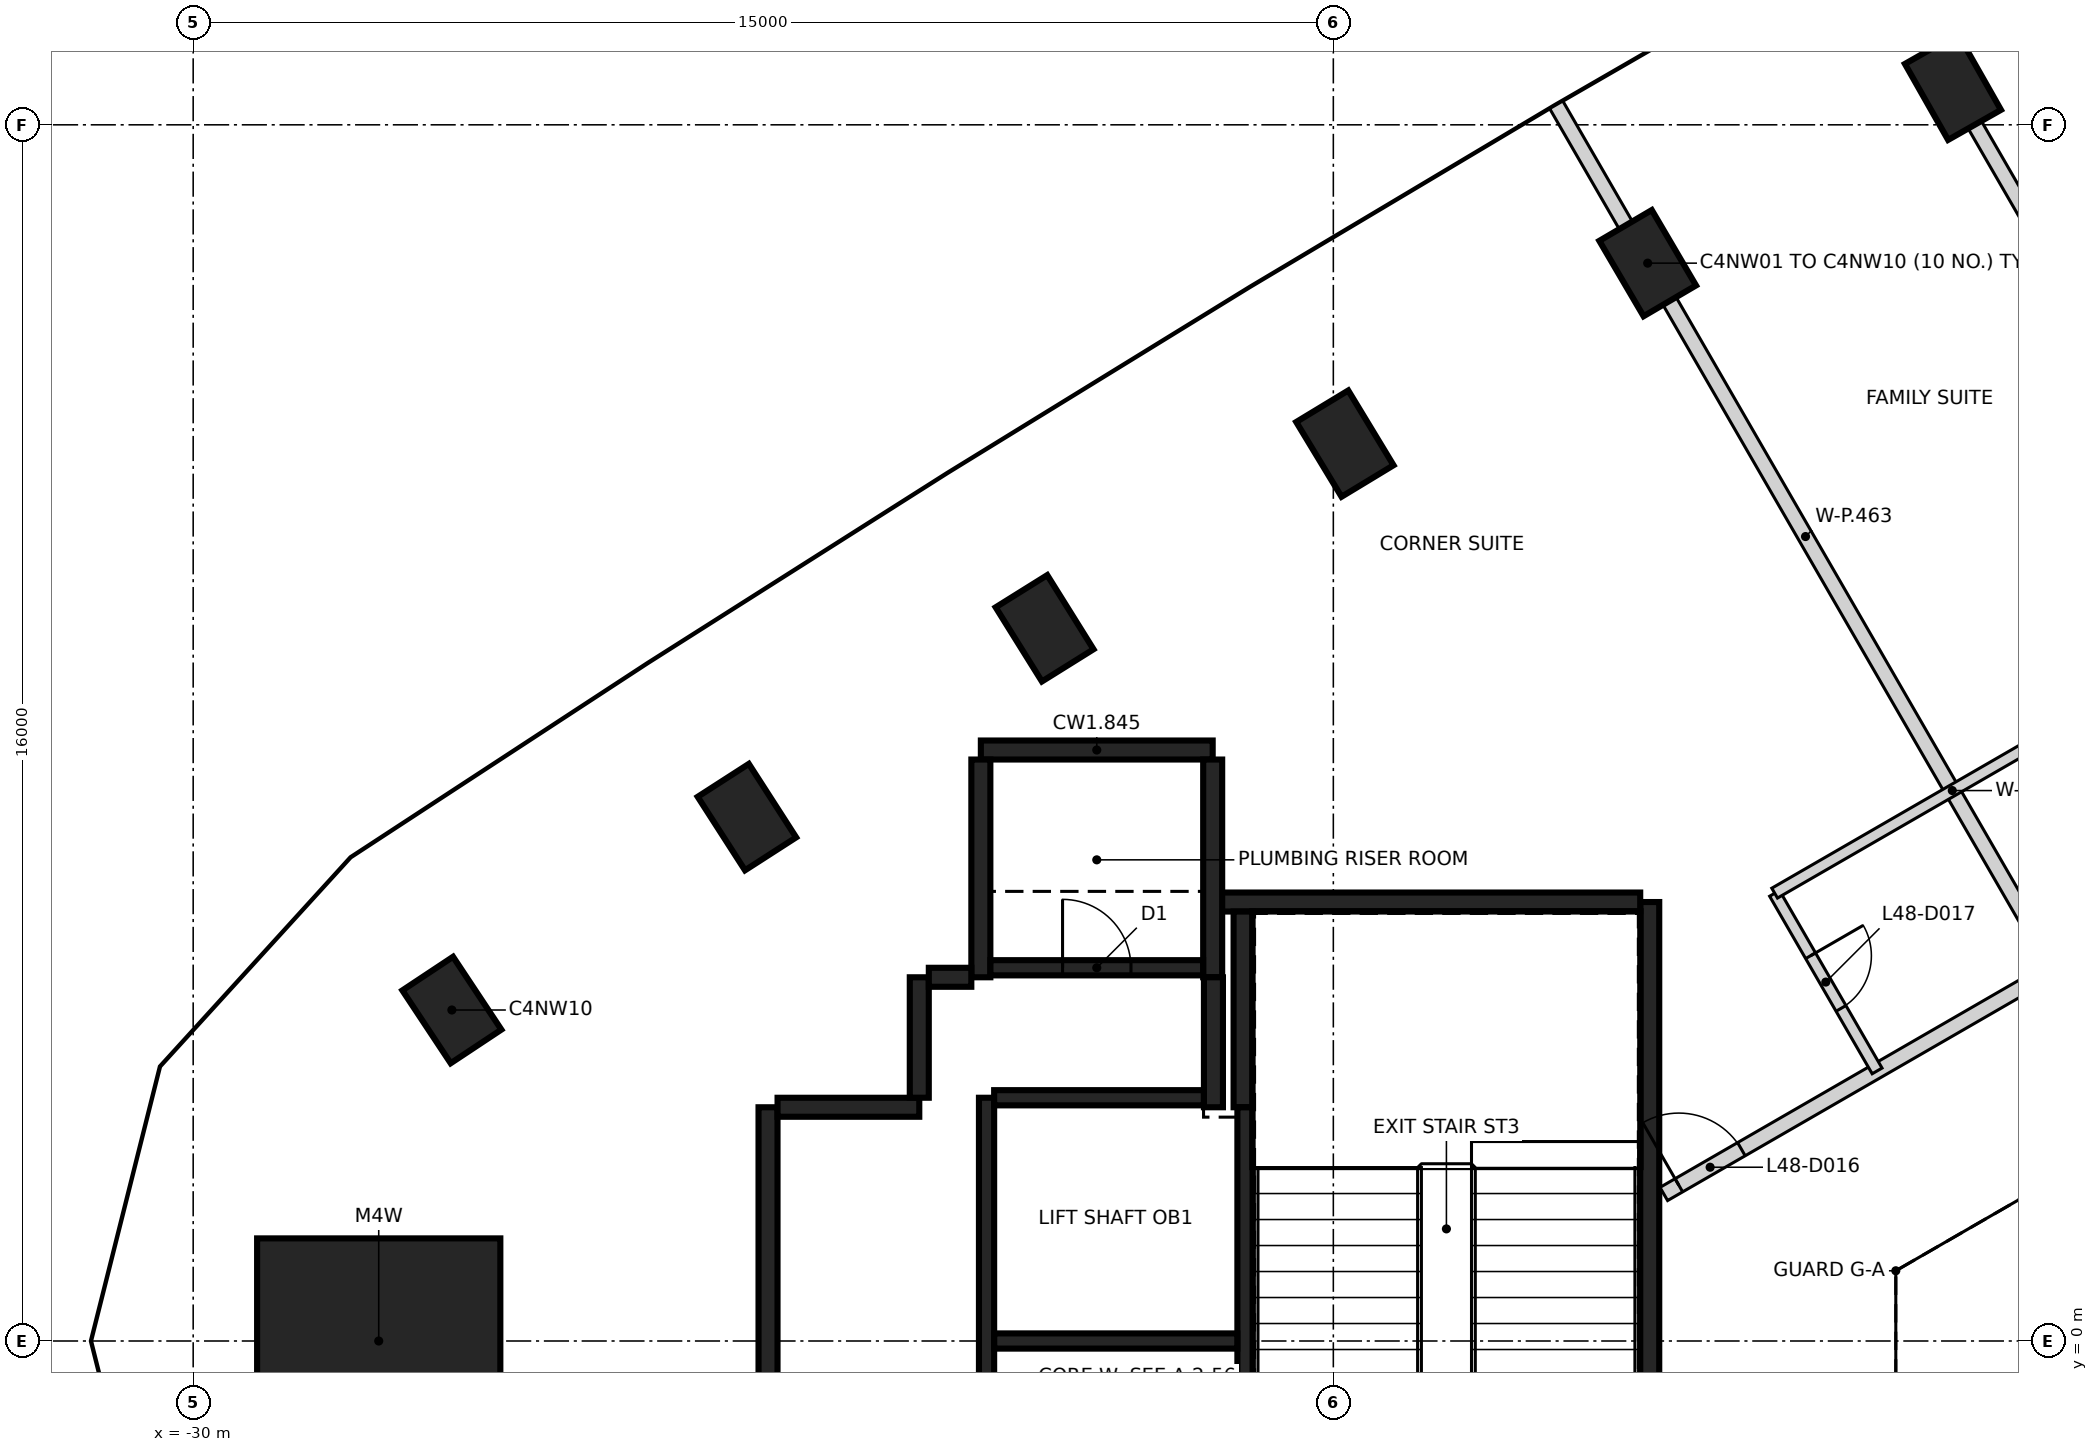
"""IFC4 building model, lengths in metres.
Left out: names, types, materials, properties, quantities, classifications, styles, units other than length and angle.
Written with IfcOpenShell. Run it as: python <this file> out.ifc"""

import sys

from ifc_helpers import new_model, si_unit, direction, frame, frame_2d, origin, origin_2d, place, context, subcontext, project, spatial, rectangle, extrude, element, fill, save


model = new_model("IFC4")
c1 = context("Model", 3, precision=1e-05, world=origin(), true_north=direction((0.0, 1.0)))
c2 = subcontext(c1, "Body", "Model", "MODEL_VIEW")
j1 = project(units=[si_unit("LENGTHUNIT", "METRE"), si_unit("PLANEANGLEUNIT", "RADIAN")], contexts=[c1])
p1 = place(None, origin())
s1 = spatial("IfcSite", under=j1, at=p1, CompositionType="ELEMENT")
p2 = place(p1, origin())
s2 = spatial("IfcBuilding", under=s1, at=p2, CompositionType="ELEMENT")
p3 = place(p2, frame((0.0, 0.0, 193.6)))
s3 = spatial("IfcBuildingStorey", under=s2, at=p3, CompositionType="ELEMENT", Elevation=193.6)
for number, where, z_axis, x_axis in (
    (1, (-6.848, 16.499, -0.35), (0.0, 0.0, 1.0), (-0.494, 0.87, 0.0)),
    (2, (-10.864, 14.18, -0.35), (0.0, 0.0, 1.0), (-0.506, 0.862, 0.0)),
    (3, (-14.848, 11.806, -0.35), (0.0, 0.0, 1.0), (-0.518, 0.855, 0.0)),
    (4, (-18.799, 9.376, -0.35), (0.0, 0.0, 1.0), (-0.529, 0.848, 0.0)),
    (5, (-22.715, 6.892, -0.35), (0.0, 0.0, 1.0), (-0.541, 0.841, 0.0)),
    (6, (-26.597, 4.354, -0.35), (0.0, 0.0, 1.0), (-0.553, 0.833, 0.0)),
):
    element("IfcColumn", number, at=place(p3, frame(where, z_axis=z_axis, x_axis=x_axis)), inside=s3, PredefinedType="COLUMN", context=c2, shape_type="SweptSolid", body=[
        extrude(rectangle(XDim=1.15, YDim=0.8, at=origin_2d()), origin(), (0.0, 0.0, 1.0), 3.6),
    ])
p4 = place(p3, frame((-27.559, 0.0, -0.35), z_axis=(0.0, 0.0, 1.0), x_axis=(1.0, 0.0, 0.0)))
e7 = element("IfcColumn", 7, at=p4, inside=s3, PredefinedType="COLUMN", context=c2, shape_type="SweptSolid", body=[
    extrude(rectangle(XDim=3.2, YDim=2.7, at=origin_2d()), origin(), (0.0, 0.0, 1.0), 3.6),
])
p5 = place(p3, frame((-10.837, 5.775, 0.0), z_axis=(0.0, 0.0, 1.0), x_axis=(0.0, -1.0, 0.0)))
e8 = element("IfcWall", 8, at=p5, inside=s3, PredefinedType="SHEAR", context=c2, shape_type="SweptSolid", body=[
    extrude(rectangle(XDim=11.55, YDim=0.25, at=frame_2d((5.775, 0.0))), origin(), (0.0, 0.0, 1.0), 3.25),
])
p6 = place(p5, frame((10.025, 0.0, 0.0)))
e9 = element("IfcOpeningElement", 9, at=p6, cuts=e8, PredefinedType="OPENING", context=c2, shape_type="SweptSolid", body=[
    extrude(rectangle(XDim=1.2, YDim=2.1, at=frame_2d((0.6, 1.05))), frame((0.0, 0.135, 0.0), z_axis=(0.0, -1.0, 0.0), x_axis=(1.0, 0.0, 0.0)), (0.0, 0.0, 1.0), 0.27),
])
p7 = place(p5, frame((8.725, 0.0, 0.0)))
e10 = element("IfcOpeningElement", 10, at=p7, cuts=e8, PredefinedType="OPENING", context=c2, shape_type="SweptSolid", body=[
    extrude(rectangle(XDim=1.2, YDim=2.1, at=frame_2d((0.6, 1.05))), frame((0.0, 0.135, 0.0), z_axis=(0.0, -1.0, 0.0), x_axis=(1.0, 0.0, 0.0)), (0.0, 0.0, 1.0), 0.27),
])
p8 = place(p3, frame((-22.437, -5.675, 0.0), z_axis=(0.0, 0.0, 1.0), x_axis=(0.0, 1.0, 0.0)))
e11 = element("IfcWall", 11, at=p8, inside=s3, PredefinedType="SHEAR", context=c2, shape_type="SweptSolid", body=[
    extrude(rectangle(XDim=8.75, YDim=0.25, at=frame_2d((4.375, 0.0))), origin(), (0.0, 0.0, 1.0), 3.25),
])
p9 = place(p3, frame((-16.472, 5.775, 0.0), z_axis=(0.0, 0.0, 1.0), x_axis=(1.0, 0.0, 0.0)))
e12 = element("IfcWall", 12, at=p9, inside=s3, PredefinedType="SHEAR", context=c2, shape_type="SweptSolid", body=[
    extrude(rectangle(XDim=5.51, YDim=0.25, at=frame_2d((2.755, 0.0))), origin(), (0.0, 0.0, 1.0), 3.25),
])
p10 = place(p3, frame((-19.637, 7.775, 0.0), z_axis=(0.0, 0.0, 1.0), x_axis=(1.0, 0.0, 0.0)))
e13 = element("IfcWall", 13, at=p10, inside=s3, PredefinedType="SHEAR", context=c2, shape_type="SweptSolid", body=[
    extrude(rectangle(XDim=3.05, YDim=0.25, at=frame_2d((1.525, 0.0))), origin(), (0.0, 0.0, 1.0), 3.25),
])
for number, where, z_axis, x_axis in (
    (14, (-16.587, 7.65, 0.0), (0.0, 0.0, 1.0), (0.0, -1.0, 0.0)),
    (15, (-19.637, 4.785, 0.0), (0.0, 0.0, 1.0), (0.0, 1.0, 0.0)),
):
    element("IfcWall", number, at=place(p3, frame(where, z_axis=z_axis, x_axis=x_axis)), inside=s3, PredefinedType="SHEAR", context=c2, shape_type="SweptSolid", body=[
        extrude(rectangle(XDim=2.865, YDim=0.25, at=frame_2d((1.432, 0.0))), origin(), (0.0, 0.0, 1.0), 3.25),
    ])
p11 = place(p3, frame((-16.187, 3.075, 0.0), z_axis=(0.0, 0.0, 1.0), x_axis=(0.0, 1.0, 0.0)))
e16 = element("IfcWall", 16, at=p11, inside=s3, PredefinedType="SHEAR", context=c2, shape_type="SweptSolid", body=[
    extrude(rectangle(XDim=2.575, YDim=0.25, at=frame_2d((1.287, 0.0))), origin(), (0.0, 0.0, 1.0), 3.25),
])
p12 = place(p3, frame((-22.312, 3.075, 0.0), z_axis=(0.0, 0.0, 1.0), x_axis=(1.0, 0.0, 0.0)))
e17 = element("IfcWall", 17, at=p12, inside=s3, PredefinedType="SHEAR", context=c2, shape_type="SweptSolid", body=[
    extrude(rectangle(XDim=1.865, YDim=0.25, at=frame_2d((0.932, 0.0))), origin(), (0.0, 0.0, 1.0), 3.25),
])
p13 = place(p3, frame((-16.577, 4.785, 0.0), z_axis=(0.0, 0.0, 1.0), x_axis=(0.0, -1.0, 0.0)))
e18 = element("IfcWall", 18, at=p13, inside=s3, PredefinedType="SHEAR", context=c2, shape_type="SweptSolid", body=[
    extrude(rectangle(XDim=1.71, YDim=0.25, at=frame_2d((0.855, 0.0))), origin(), (0.0, 0.0, 1.0), 3.25),
])
p14 = place(p3, frame((-20.447, 3.2, 0.0), z_axis=(0.0, 0.0, 1.0), x_axis=(0.0, 1.0, 0.0)))
e19 = element("IfcWall", 19, at=p14, inside=s3, PredefinedType="SHEAR", context=c2, shape_type="SweptSolid", body=[
    extrude(rectangle(XDim=1.584, YDim=0.25, at=frame_2d((0.792, 0.0))), origin(), (0.0, 0.0, 1.0), 3.25),
])
p15 = place(p3, frame((-20.322, 4.785, 0.0), z_axis=(0.0, 0.0, 1.0), x_axis=(1.0, 0.0, 0.0)))
e20 = element("IfcWall", 20, at=p15, inside=s3, PredefinedType="SHEAR", context=c2, shape_type="SweptSolid", body=[
    extrude(rectangle(XDim=0.559, YDim=0.25, at=frame_2d((0.28, 0.0))), origin(), (0.0, 0.0, 1.0), 3.25),
])
p16 = place(p3, frame((-16.162, 3.074, 0.0), z_axis=(0.0, 0.0, 1.0), x_axis=(0.0, -1.0, 0.0)))
e21 = element("IfcWall", 21, at=p16, inside=s3, PredefinedType="SHEAR", context=c2, shape_type="SweptSolid", body=[
    extrude(rectangle(XDim=5.974, YDim=0.2, at=frame_2d((2.987, 0.0))), origin(), (0.0, 0.0, 1.0), 3.25),
])
p17 = place(p3, frame((-19.562, -2.9, 0.0), z_axis=(0.0, 0.0, 1.0), x_axis=(0.0, 1.0, 0.0)))
e22 = element("IfcWall", 22, at=p17, inside=s3, PredefinedType="SHEAR", context=c2, shape_type="SweptSolid", body=[
    extrude(rectangle(XDim=6.1, YDim=0.2, at=frame_2d((3.05, 0.0))), origin(), (0.0, 0.0, 1.0), 3.25),
])
p18 = place(p3, frame((-16.263, 0.0, 0.0), z_axis=(0.0, 0.0, 1.0), x_axis=(-1.0, 0.0, 0.0)))
e23 = element("IfcWall", 23, at=p18, inside=s3, PredefinedType="SHEAR", context=c2, shape_type="SweptSolid", body=[
    extrude(rectangle(XDim=3.198, YDim=0.2, at=frame_2d((1.599, 0.0))), origin(), (0.0, 0.0, 1.0), 3.25),
])
p19 = place(p3, frame((-19.511, 4.91, 0.0), z_axis=(0.0, 0.0, 1.0), x_axis=(1.0, 0.0, 0.0)))
e24 = element("IfcWall", 24, at=p19, inside=s3, PredefinedType="SHEAR", context=c2, shape_type="SweptSolid", body=[
    extrude(rectangle(XDim=2.798, YDim=0.2, at=frame_2d((1.399, 0.0))), origin(), (0.0, 0.0, 1.0), 3.25),
])
p20 = place(p19, frame((0.949, 0.0, 0.0)))
e25 = element("IfcOpeningElement", 25, at=p20, cuts=e24, PredefinedType="OPENING", context=c2, shape_type="SweptSolid", body=[
    extrude(rectangle(XDim=0.9, YDim=2.1, at=frame_2d((0.45, 1.05))), frame((0.0, 0.11, 0.0), z_axis=(0.0, -1.0, 0.0), x_axis=(1.0, 0.0, 0.0)), (0.0, 0.0, 1.0), 0.22),
])
p21 = place(p3, frame((-19.462, 3.2, 0.0), z_axis=(0.0, 0.0, 1.0), x_axis=(1.0, 0.0, 0.0)))
e26 = element("IfcWall", 26, at=p21, inside=s3, PredefinedType="SHEAR", context=c2, shape_type="SweptSolid", body=[
    extrude(rectangle(XDim=2.759, YDim=0.2, at=frame_2d((1.379, 0.0))), origin(), (0.0, 0.0, 1.0), 3.25),
])
p22 = place(p3, frame((-10.652, 1.934, 0.0), z_axis=(0.0, 0.0, 1.0), x_axis=(0.866066882415, 0.499928150021, 0.0)))
e27 = element("IfcWall", 27, at=p22, inside=s3, PredefinedType="PARTITIONING", context=c2, shape_type="SweptSolid", body=[
    extrude(rectangle(XDim=12.98, YDim=0.2, at=frame_2d((6.49, 0.0))), origin(), (0.0, 0.0, 1.0), 3.25),
])
p23 = place(p22, frame((9.439, 0.0, 0.0)))
e28 = element("IfcOpeningElement", 28, at=p23, cuts=e27, PredefinedType="OPENING", context=c2, shape_type="SweptSolid", body=[
    extrude(rectangle(XDim=0.95, YDim=2.1, at=frame_2d((0.475, 1.05))), frame((0.0, 0.11, 0.0), z_axis=(0.0, -1.0, 0.0), x_axis=(1.0, 0.0, 0.0)), (0.0, 0.0, 1.0), 0.22),
])
p24 = place(p22, frame((0.229, 0.0, 0.0)))
e29 = element("IfcOpeningElement", 29, at=p24, cuts=e27, PredefinedType="OPENING", context=c2, shape_type="SweptSolid", body=[
    extrude(rectangle(XDim=0.95, YDim=2.1, at=frame_2d((0.475, 1.05))), frame((0.0, 0.11, 0.0), z_axis=(0.0, -1.0, 0.0), x_axis=(1.0, 0.0, 0.0)), (0.0, 0.0, 1.0), 0.22),
])
p25 = place(p3, frame((-12.067, 16.263, 0.0), z_axis=(0.0, 0.0, 1.0), x_axis=(0.500016190239, -0.866016056144, 0.0)))
e30 = element("IfcWall", 30, at=p25, inside=s3, PredefinedType="PARTITIONING", context=c2, shape_type="SweptSolid", body=[
    extrude(rectangle(XDim=13.118, YDim=0.2, at=frame_2d((6.559, 0.0))), origin(), (0.0, 0.0, 1.0), 3.25),
])
p26 = place(p3, frame((-8.052, 18.582, 0.0), z_axis=(0.0, 0.0, 1.0), x_axis=(0.500046266189, -0.86599869034, 0.0)))
e31 = element("IfcWall", 31, at=p26, inside=s3, PredefinedType="PARTITIONING", context=c2, shape_type="SweptSolid", body=[
    extrude(rectangle(XDim=13.118, YDim=0.2, at=frame_2d((6.559, 0.0))), origin(), (0.0, 0.0, 1.0), 3.25),
])
p27 = place(p3, frame((-9.195, 5.889, 0.0), z_axis=(0.0, 0.0, 1.0), x_axis=(0.500129820725, -0.865950438779, 0.0)))
e32 = element("IfcWall", 32, at=p27, inside=s3, PredefinedType="PARTITIONING", context=c2, shape_type="SweptSolid", body=[
    extrude(rectangle(XDim=2.698, YDim=0.15, at=frame_2d((1.349, 0.0))), origin(), (0.0, 0.0, 1.0), 3.25),
])
p28 = place(p27, frame((0.948, 0.0, 0.0)))
e33 = element("IfcOpeningElement", 33, at=p28, cuts=e32, PredefinedType="OPENING", context=c2, shape_type="SweptSolid", body=[
    extrude(rectangle(XDim=0.8, YDim=2.1, at=frame_2d((0.4, 1.05))), frame((0.0, 0.085, 0.0), z_axis=(0.0, -1.0, 0.0), x_axis=(1.0, 0.0, 0.0)), (0.0, 0.0, 1.0), 0.17),
])
p29 = place(p3, frame((-9.194, 5.892, 0.0), z_axis=(0.0, 0.0, 1.0), x_axis=(0.8659934935, 0.500055266161, 0.0)))
e34 = element("IfcWall", 34, at=p29, inside=s3, PredefinedType="PARTITIONING", context=c2, shape_type="SweptSolid", body=[
    extrude(rectangle(XDim=5.397, YDim=0.15, at=frame_2d((2.699, 0.0))), origin(), (0.0, 0.0, 1.0), 3.25),
])
p30 = place(p20, origin())
e35 = element("IfcDoor", 35, at=p30, inside=s3, OperationType="SINGLE_SWING_RIGHT", PredefinedType="DOOR", context=c2, shape_type="SweptSolid", body=[
    extrude(rectangle(XDim=0.9, YDim=2.1, at=frame_2d((0.45, 1.05))), frame((0.0, 0.025, 0.0), z_axis=(0.0, -1.0, 0.0), x_axis=(1.0, 0.0, 0.0)), (0.0, 0.0, 1.0), 0.05),
])
fill(e25, e35)
p31 = place(p24, origin())
e36 = element("IfcDoor", 36, at=p31, inside=s3, OperationType="SINGLE_SWING_LEFT", PredefinedType="DOOR", context=c2, shape_type="SweptSolid", body=[
    extrude(rectangle(XDim=0.95, YDim=2.1, at=frame_2d((0.475, 1.05))), frame((0.0, 0.025, 0.0), z_axis=(0.0, -1.0, 0.0), x_axis=(1.0, 0.0, 0.0)), (0.0, 0.0, 1.0), 0.05),
])
fill(e29, e36)
p32 = place(p28, frame((0.8, 0.0, 0.0), z_axis=(0.0, 0.0, 1.0), x_axis=(-1.0, 0.0, 0.0)))
e37 = element("IfcDoor", 37, at=p32, inside=s3, OperationType="SINGLE_SWING_LEFT", PredefinedType="DOOR", context=c2, shape_type="SweptSolid", body=[
    extrude(rectangle(XDim=0.8, YDim=2.1, at=frame_2d((0.4, 1.05))), frame((0.0, 0.025, 0.0), z_axis=(0.0, -1.0, 0.0), x_axis=(1.0, 0.0, 0.0)), (0.0, 0.0, 1.0), 0.05),
])
fill(e33, e37)
save(model, sys.argv[1])
